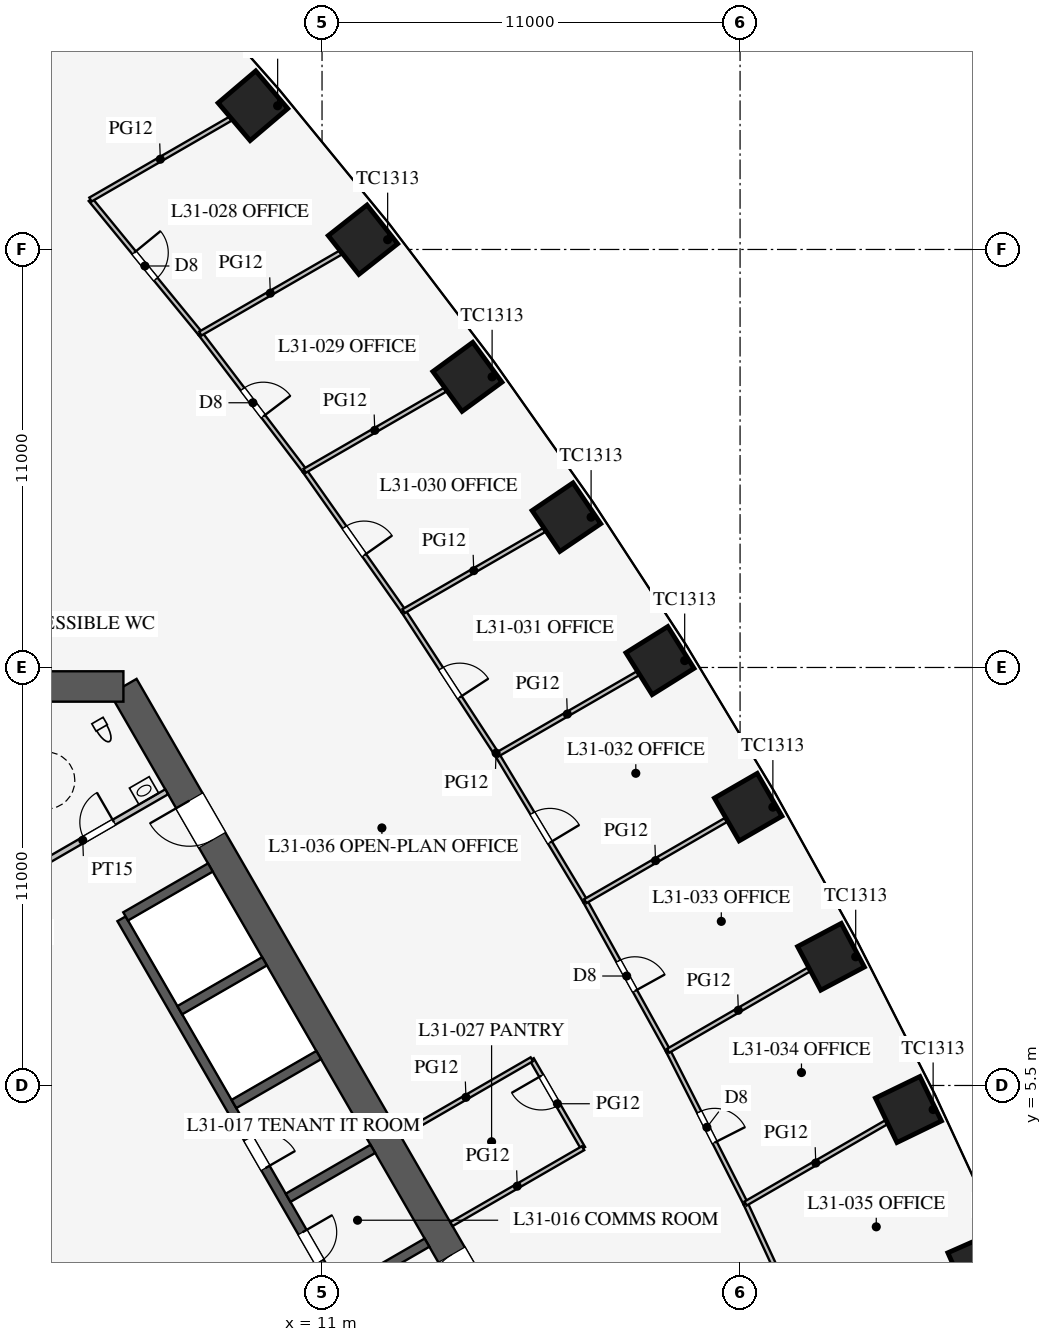
"""IFC4 building model, lengths in metres.
Left out: names, types, materials, properties, quantities, classifications, styles, units other than length and angle.
Written with IfcOpenShell. Run it as: python <this file> out.ifc"""

import sys

from ifc_helpers import new_model, si_unit, direction, frame, frame_2d, origin, origin_2d, place, context, subcontext, project, spatial, rectangle, extrude, element, fill, save


model = new_model("IFC4")
c1 = context("Model", 3, precision=1e-05, world=origin(), true_north=direction((0.0, 1.0)))
c2 = subcontext(c1, "Body", "Model", "MODEL_VIEW")
j1 = project(units=[si_unit("LENGTHUNIT", "METRE"), si_unit("PLANEANGLEUNIT", "RADIAN")], contexts=[c1])
p1 = place(None, origin())
s1 = spatial("IfcSite", under=j1, at=p1, CompositionType="ELEMENT")
p2 = place(p1, origin())
s2 = spatial("IfcBuilding", under=s1, at=p2, CompositionType="ELEMENT")
p3 = place(p2, frame((0.0, 0.0, 136.7)))
s3 = spatial("IfcBuildingStorey", under=s2, at=p3, CompositionType="ELEMENT", Elevation=136.7)
for number, where, z_axis, x_axis in (
    (1, (28.325, 0.765, 0.0), (0.0, 0.0, 1.0), (-0.403, 0.915, 0.0)),
    (2, (26.43, 4.867, 0.0), (0.0, 0.0, 1.0), (-0.436, 0.9, 0.0)),
    (3, (24.393, 8.887, 0.0), (0.0, 0.0, 1.0), (-0.468, 0.883, 0.0)),
    (4, (22.213, 12.825, 0.0), (0.0, 0.0, 1.0), (-0.5, 0.866, 0.0)),
    (5, (19.893, 16.681, 0.0), (0.0, 0.0, 1.0), (-0.531, 0.847, 0.0)),
    (6, (17.43, 20.456, 0.0), (0.0, 0.0, 1.0), (-0.561, 0.828, 0.0)),
    (7, (14.825, 24.148, 0.0), (0.0, 0.0, 1.0), (-0.591, 0.807, 0.0)),
    (8, (12.077, 27.757, 0.0), (0.0, 0.0, 1.0), (-0.62, 0.785, 0.0)),
    (9, (9.182, 31.282, 0.0), (0.0, 0.0, 1.0), (-0.648, 0.762, 0.0)),
):
    element("IfcColumn", number, at=place(p3, frame(where, z_axis=z_axis, x_axis=x_axis)), inside=s3, PredefinedType="COLUMN", context=c2, shape_type="SweptSolid", body=[
        extrude(rectangle(XDim=1.3, YDim=1.3, at=origin_2d()), origin(), (0.0, 0.0, 1.0), 4.2),
    ])
p4 = place(p3, frame((16.743, -3.0, 0.0), z_axis=(0.0, 0.0, 1.0), x_axis=(-0.500002442456, 0.866023993627, 0.0)))
e10 = element("IfcWall", 10, at=p4, inside=s3, PredefinedType="SHEAR", context=c2, shape_type="SweptSolid", body=[
    extrude(rectangle(XDim=21.939, YDim=0.8, at=frame_2d((10.97, 0.0))), origin(), (0.0, 0.0, 1.0), 4.2),
])
p5 = place(p4, frame((17.27, 0.0, 0.0)))
e11 = element("IfcOpeningElement", 11, at=p5, cuts=e10, PredefinedType="OPENING", context=c2, shape_type="SweptSolid", body=[
    extrude(rectangle(XDim=1.2, YDim=2.1, at=frame_2d((0.6, 1.05))), frame((0.0, 0.41, 0.0), z_axis=(0.0, -1.0, 0.0), x_axis=(1.0, 0.0, 0.0)), (0.0, 0.0, 1.0), 0.82),
])
p6 = place(p4, frame((3.47, 0.0, 0.0)))
e12 = element("IfcOpeningElement", 12, at=p6, cuts=e10, PredefinedType="OPENING", context=c2, shape_type="SweptSolid", body=[
    extrude(rectangle(XDim=1.2, YDim=2.1, at=frame_2d((0.6, 1.05))), frame((0.0, 0.41, 0.0), z_axis=(0.0, -1.0, 0.0), x_axis=(1.0, 0.0, 0.0)), (0.0, 0.0, 1.0), 0.82),
])
p7 = place(p3, frame((5.773, 16.0, 0.0), z_axis=(0.0, 0.0, 1.0), x_axis=(-1.0, 0.0, 0.0)))
e13 = element("IfcWall", 13, at=p7, inside=s3, PredefinedType="SHEAR", context=c2, shape_type="SweptSolid", body=[
    extrude(rectangle(XDim=11.547, YDim=0.8, at=frame_2d((5.773, 0.0))), origin(), (0.0, 0.0, 1.0), 4.2),
])
p8 = place(p3, frame((11.424, 0.014, 0.0), z_axis=(0.0, 0.0, 1.0), x_axis=(-0.500001763848, 0.866024385424, 0.0)))
e14 = element("IfcWall", 14, at=p8, inside=s3, PredefinedType="SHEAR", context=c2, shape_type="SweptSolid", body=[
    extrude(rectangle(XDim=11.4, YDim=0.25, at=frame_2d((5.7, 0.0))), origin(), (0.0, 0.0, 1.0), 4.2),
])
p9 = place(p8, frame((0.975, 0.0, 0.0)))
e15 = element("IfcOpeningElement", 15, at=p9, cuts=e14, PredefinedType="OPENING", context=c2, shape_type="SweptSolid", body=[
    extrude(rectangle(XDim=0.9, YDim=2.1, at=frame_2d((0.45, 1.05))), frame((0.0, 0.135, 0.0), z_axis=(0.0, -1.0, 0.0), x_axis=(1.0, 0.0, 0.0)), (0.0, 0.0, 1.0), 0.27),
])
p10 = place(p8, frame((3.825, 0.0, 0.0)))
e16 = element("IfcOpeningElement", 16, at=p10, cuts=e14, PredefinedType="OPENING", context=c2, shape_type="SweptSolid", body=[
    extrude(rectangle(XDim=0.9, YDim=2.1, at=frame_2d((0.45, 1.05))), frame((0.0, 0.135, 0.0), z_axis=(0.0, -1.0, 0.0), x_axis=(1.0, 0.0, 0.0)), (0.0, 0.0, 1.0), 0.27),
])
for number, where, z_axis, x_axis in (
    (17, (11.532, 0.076, 0.0), (0.0, 0.0, 1.0), (0.866, 0.5, 0.0)),
    (18, (10.107, 2.544, 0.0), (0.0, 0.0, 1.0), (0.866, 0.5, 0.0)),
    (19, (8.682, 5.012, 0.0), (0.0, 0.0, 1.0), (0.866, 0.5, 0.0)),
    (20, (7.257, 7.481, 0.0), (0.0, 0.0, 1.0), (0.866, 0.5, 0.0)),
):
    element("IfcWall", number, at=place(p3, frame(where, z_axis=z_axis, x_axis=x_axis)), inside=s3, PredefinedType="SHEAR", context=c2, shape_type="SweptSolid", body=[
        extrude(rectangle(XDim=2.575, YDim=0.25, at=frame_2d((1.288, 0.0))), origin(), (0.0, 0.0, 1.0), 4.2),
    ])
p11 = place(p3, frame((5.832, 9.949, 0.0), z_axis=(0.0, 0.0, 1.0), x_axis=(0.866029291668, 0.499993265928, 0.0)))
e21 = element("IfcWall", 21, at=p11, inside=s3, PredefinedType="SHEAR", context=c2, shape_type="SweptSolid", body=[
    extrude(rectangle(XDim=2.575, YDim=0.25, at=frame_2d((1.288, 0.0))), origin(), (0.0, 0.0, 1.0), 4.2),
])
p12 = place(p3, frame((2.495, 10.678, 0.0), z_axis=(0.0, 0.0, 1.0), x_axis=(0.86602216432, 0.500005610874, 0.0)))
e22 = element("IfcWall", 22, at=p12, inside=s3, PredefinedType="PARTITIONING", context=c2, shape_type="SweptSolid", body=[
    extrude(rectangle(XDim=5.1, YDim=0.15, at=frame_2d((2.55, 0.0))), origin(), (0.0, 0.0, 1.0), 4.0),
])
p13 = place(p12, frame((2.6, 0.0, 0.0)))
e23 = element("IfcOpeningElement", 23, at=p13, cuts=e22, PredefinedType="OPENING", context=c2, shape_type="SweptSolid", body=[
    extrude(rectangle(XDim=0.9, YDim=2.1, at=frame_2d((0.45, 1.05))), frame((0.0, 0.085, 0.0), z_axis=(0.0, -1.0, 0.0), x_axis=(1.0, 0.0, 0.0)), (0.0, 0.0, 1.0), 0.17),
])
p14 = place(p3, frame((17.869, 3.85, 0.0), z_axis=(0.0, 0.0, 1.0), x_axis=(-0.500048589285, 0.86599734893, 0.0)))
e24 = element("IfcWall", 24, at=p14, inside=s3, PredefinedType="PARTITIONING", context=c2, shape_type="SweptSolid", body=[
    extrude(rectangle(XDim=2.7, YDim=0.12, at=frame_2d((1.35, 0.0))), origin(), (0.0, 0.0, 1.0), 2.9),
])
p15 = place(p14, frame((1.3, 0.0, 0.15)))
e25 = element("IfcOpeningElement", 25, at=p15, cuts=e24, PredefinedType="OPENING", context=c2, shape_type="SweptSolid", body=[
    extrude(rectangle(XDim=0.9, YDim=2.1, at=frame_2d((0.45, 1.05))), frame((0.0, 0.07, 0.0), z_axis=(0.0, -1.0, 0.0), x_axis=(1.0, 0.0, 0.0)), (0.0, 0.0, 1.0), 0.14),
])
for number, where, z_axis, x_axis in (
    (26, (13.055, 4.188, 0.0), (0.0, 0.0, 1.0), (0.866, 0.5, 0.0)),
    (27, (14.405, 1.85, 0.0), (0.0, 0.0, 1.0), (0.866, 0.5, 0.0)),
):
    element("IfcWall", number, at=place(p3, frame(where, z_axis=z_axis, x_axis=x_axis)), inside=s3, PredefinedType="PARTITIONING", context=c2, shape_type="SweptSolid", body=[
        extrude(rectangle(XDim=4.0, YDim=0.12, at=frame_2d((2.0, 0.0))), origin(), (0.0, 0.0, 1.0), 2.9),
    ])
p16 = place(p3, frame((17.927, 10.35, 0.0), z_axis=(0.0, 0.0, 1.0), x_axis=(-0.515548366618, 0.856860479703, 0.0)))
e28 = element("IfcWall", 28, at=p16, inside=s3, PredefinedType="PARTITIONING", context=c2, shape_type="SweptSolid", body=[
    extrude(rectangle(XDim=4.501, YDim=0.12, at=frame_2d((2.25, 0.0))), origin(), (0.0, 0.0, 1.0), 2.9),
])
p17 = place(p16, frame((1.8, 0.0, 0.15)))
e29 = element("IfcOpeningElement", 29, at=p17, cuts=e28, PredefinedType="OPENING", context=c2, shape_type="SweptSolid", body=[
    extrude(rectangle(XDim=0.9, YDim=2.1, at=frame_2d((0.45, 1.05))), frame((0.0, 0.07, 0.0), z_axis=(0.0, -1.0, 0.0), x_axis=(1.0, 0.0, 0.0)), (0.0, 0.0, 1.0), 0.14),
])
p18 = place(p3, frame((10.543, 21.675, 0.0), z_axis=(0.0, 0.0, 1.0), x_axis=(-0.605274299339, 0.796016973789, 0.0)))
e30 = element("IfcWall", 30, at=p18, inside=s3, PredefinedType="PARTITIONING", context=c2, shape_type="SweptSolid", body=[
    extrude(rectangle(XDim=4.536, YDim=0.12, at=frame_2d((2.268, 0.0))), origin(), (0.0, 0.0, 1.0), 2.9),
])
p19 = place(p18, frame((1.8, 0.0, 0.15)))
e31 = element("IfcOpeningElement", 31, at=p19, cuts=e30, PredefinedType="OPENING", context=c2, shape_type="SweptSolid", body=[
    extrude(rectangle(XDim=0.9, YDim=2.1, at=frame_2d((0.45, 1.05))), frame((0.0, 0.07, 0.0), z_axis=(0.0, -1.0, 0.0), x_axis=(1.0, 0.0, 0.0)), (0.0, 0.0, 1.0), 0.14),
])
p20 = place(p3, frame((7.797, 25.286, 0.0), z_axis=(0.0, 0.0, 1.0), x_axis=(-0.633843962561, 0.773460943503, 0.0)))
e32 = element("IfcWall", 32, at=p20, inside=s3, PredefinedType="PARTITIONING", context=c2, shape_type="SweptSolid", body=[
    extrude(rectangle(XDim=4.561, YDim=0.12, at=frame_2d((2.28, 0.0))), origin(), (0.0, 0.0, 1.0), 2.9),
])
p21 = place(p20, frame((1.85, 0.0, 0.15)))
e33 = element("IfcOpeningElement", 33, at=p21, cuts=e32, PredefinedType="OPENING", context=c2, shape_type="SweptSolid", body=[
    extrude(rectangle(XDim=0.9, YDim=2.1, at=frame_2d((0.45, 1.05))), frame((0.0, 0.07, 0.0), z_axis=(0.0, -1.0, 0.0), x_axis=(1.0, 0.0, 0.0)), (0.0, 0.0, 1.0), 0.14),
])
p22 = place(p3, frame((15.606, 14.206, 0.0), z_axis=(0.0, 0.0, 1.0), x_axis=(-0.546069464151, 0.837739900161, 0.0)))
e34 = element("IfcWall", 34, at=p22, inside=s3, PredefinedType="PARTITIONING", context=c2, shape_type="SweptSolid", body=[
    extrude(rectangle(XDim=4.507, YDim=0.12, at=frame_2d((2.253, 0.0))), origin(), (0.0, 0.0, 1.0), 2.9),
])
p23 = place(p22, frame((1.8, 0.0, 0.15)))
e35 = element("IfcOpeningElement", 35, at=p23, cuts=e34, PredefinedType="OPENING", context=c2, shape_type="SweptSolid", body=[
    extrude(rectangle(XDim=0.9, YDim=2.1, at=frame_2d((0.45, 1.05))), frame((0.0, 0.07, 0.0), z_axis=(0.0, -1.0, 0.0), x_axis=(1.0, 0.0, 0.0)), (0.0, 0.0, 1.0), 0.14),
])
p24 = place(p3, frame((13.145, 17.982, 0.0), z_axis=(0.0, 0.0, 1.0), x_axis=(-0.575987178736, 0.817458726745, 0.0)))
e36 = element("IfcWall", 36, at=p24, inside=s3, PredefinedType="PARTITIONING", context=c2, shape_type="SweptSolid", body=[
    extrude(rectangle(XDim=4.518, YDim=0.12, at=frame_2d((2.259, 0.0))), origin(), (0.0, 0.0, 1.0), 2.9),
])
p25 = place(p24, frame((1.8, 0.0, 0.15)))
e37 = element("IfcOpeningElement", 37, at=p25, cuts=e36, PredefinedType="OPENING", context=c2, shape_type="SweptSolid", body=[
    extrude(rectangle(XDim=0.9, YDim=2.1, at=frame_2d((0.45, 1.05))), frame((0.0, 0.07, 0.0), z_axis=(0.0, -1.0, 0.0), x_axis=(1.0, 0.0, 0.0)), (0.0, 0.0, 1.0), 0.14),
])
p26 = place(p3, frame((24.043, -1.708, 0.0), z_axis=(0.0, 0.0, 1.0), x_axis=(-0.41992827805, 0.90755729367, 0.0)))
e38 = element("IfcWall", 38, at=p26, inside=s3, PredefinedType="PARTITIONING", context=c2, shape_type="SweptSolid", body=[
    extrude(rectangle(XDim=4.519, YDim=0.12, at=frame_2d((2.259, 0.0))), origin(), (0.0, 0.0, 1.0), 2.9),
])
p27 = place(p26, frame((1.8, 0.0, 0.15)))
e39 = element("IfcOpeningElement", 39, at=p27, cuts=e38, PredefinedType="OPENING", context=c2, shape_type="SweptSolid", body=[
    extrude(rectangle(XDim=0.9, YDim=2.1, at=frame_2d((0.45, 1.05))), frame((0.0, 0.07, 0.0), z_axis=(0.0, -1.0, 0.0), x_axis=(1.0, 0.0, 0.0)), (0.0, 0.0, 1.0), 0.14),
])
p28 = place(p3, frame((20.106, 6.412, 0.0), z_axis=(0.0, 0.0, 1.0), x_axis=(-0.484292898211, 0.874905931368, 0.0)))
e40 = element("IfcWall", 40, at=p28, inside=s3, PredefinedType="PARTITIONING", context=c2, shape_type="SweptSolid", body=[
    extrude(rectangle(XDim=4.501, YDim=0.12, at=frame_2d((2.25, 0.0))), origin(), (0.0, 0.0, 1.0), 2.9),
])
p29 = place(p28, frame((1.8, 0.0, 0.15)))
e41 = element("IfcOpeningElement", 41, at=p29, cuts=e40, PredefinedType="OPENING", context=c2, shape_type="SweptSolid", body=[
    extrude(rectangle(XDim=0.9, YDim=2.1, at=frame_2d((0.45, 1.05))), frame((0.0, 0.07, 0.0), z_axis=(0.0, -1.0, 0.0), x_axis=(1.0, 0.0, 0.0)), (0.0, 0.0, 1.0), 0.14),
])
p30 = place(p3, frame((22.145, 2.393, 0.0), z_axis=(0.0, 0.0, 1.0), x_axis=(-0.452471679136, 0.891778772779, 0.0)))
e42 = element("IfcWall", 42, at=p30, inside=s3, PredefinedType="PARTITIONING", context=c2, shape_type="SweptSolid", body=[
    extrude(rectangle(XDim=4.507, YDim=0.12, at=frame_2d((2.253, 0.0))), origin(), (0.0, 0.0, 1.0), 2.9),
])
p31 = place(p30, frame((1.8, 0.0, 0.15)))
e43 = element("IfcOpeningElement", 43, at=p31, cuts=e42, PredefinedType="OPENING", context=c2, shape_type="SweptSolid", body=[
    extrude(rectangle(XDim=0.9, YDim=2.1, at=frame_2d((0.45, 1.05))), frame((0.0, 0.07, 0.0), z_axis=(0.0, -1.0, 0.0), x_axis=(1.0, 0.0, 0.0)), (0.0, 0.0, 1.0), 0.14),
])
p32 = place(p3, frame((17.927, 10.35, 0.0), z_axis=(0.0, 0.0, 1.0), x_axis=(0.866014192265, 0.500019418418, 0.0)))
e44 = element("IfcWall", 44, at=p32, inside=s3, PredefinedType="PARTITIONING", context=c2, shape_type="SweptSolid", body=[
    extrude(rectangle(XDim=4.27, YDim=0.12, at=frame_2d((2.135, 0.0))), origin(), (0.0, 0.0, 1.0), 2.9),
])
p33 = place(p3, frame((10.543, 21.675, 0.0), z_axis=(0.0, 0.0, 1.0), x_axis=(0.866031027007, 0.499990260167, 0.0)))
e45 = element("IfcWall", 45, at=p33, inside=s3, PredefinedType="PARTITIONING", context=c2, shape_type="SweptSolid", body=[
    extrude(rectangle(XDim=4.261, YDim=0.12, at=frame_2d((2.131, 0.0))), origin(), (0.0, 0.0, 1.0), 2.9),
])
p34 = place(p3, frame((7.797, 25.286, 0.0), z_axis=(0.0, 0.0, 1.0), x_axis=(0.865995408045, 0.500051950547, 0.0)))
e46 = element("IfcWall", 46, at=p34, inside=s3, PredefinedType="PARTITIONING", context=c2, shape_type="SweptSolid", body=[
    extrude(rectangle(XDim=4.254, YDim=0.12, at=frame_2d((2.127, 0.0))), origin(), (0.0, 0.0, 1.0), 2.9),
])
p35 = place(p3, frame((4.906, 28.813, 0.0), z_axis=(0.0, 0.0, 1.0), x_axis=(0.866022790583, 0.50000452617, 0.0)))
e47 = element("IfcWall", 47, at=p35, inside=s3, PredefinedType="PARTITIONING", context=c2, shape_type="SweptSolid", body=[
    extrude(rectangle(XDim=4.246, YDim=0.12, at=frame_2d((2.123, 0.0))), origin(), (0.0, 0.0, 1.0), 2.9),
])
p36 = place(p3, frame((15.606, 14.206, 0.0), z_axis=(0.0, 0.0, 1.0), x_axis=(0.866020825576, 0.500007929605, 0.0)))
e48 = element("IfcWall", 48, at=p36, inside=s3, PredefinedType="PARTITIONING", context=c2, shape_type="SweptSolid", body=[
    extrude(rectangle(XDim=4.269, YDim=0.12, at=frame_2d((2.135, 0.0))), origin(), (0.0, 0.0, 1.0), 2.9),
])
p37 = place(p3, frame((13.145, 17.982, 0.0), z_axis=(0.0, 0.0, 1.0), x_axis=(0.86602643523, 0.49999821348, 0.0)))
e49 = element("IfcWall", 49, at=p37, inside=s3, PredefinedType="PARTITIONING", context=c2, shape_type="SweptSolid", body=[
    extrude(rectangle(XDim=4.266, YDim=0.12, at=frame_2d((2.133, 0.0))), origin(), (0.0, 0.0, 1.0), 2.9),
])
p38 = place(p3, frame((20.106, 6.412, 0.0), z_axis=(0.0, 0.0, 1.0), x_axis=(0.866020825576, 0.500007929605, 0.0)))
e50 = element("IfcWall", 50, at=p38, inside=s3, PredefinedType="PARTITIONING", context=c2, shape_type="SweptSolid", body=[
    extrude(rectangle(XDim=4.269, YDim=0.12, at=frame_2d((2.135, 0.0))), origin(), (0.0, 0.0, 1.0), 2.9),
])
p39 = place(p3, frame((22.145, 2.393, 0.0), z_axis=(0.0, 0.0, 1.0), x_axis=(0.86602643523, 0.49999821348, 0.0)))
e51 = element("IfcWall", 51, at=p39, inside=s3, PredefinedType="PARTITIONING", context=c2, shape_type="SweptSolid", body=[
    extrude(rectangle(XDim=4.266, YDim=0.12, at=frame_2d((2.133, 0.0))), origin(), (0.0, 0.0, 1.0), 2.9),
])
p40 = place(p13, origin())
e52 = element("IfcDoor", 52, at=p40, inside=s3, OperationType="SINGLE_SWING_RIGHT", PredefinedType="DOOR", context=c2, shape_type="SweptSolid", body=[
    extrude(rectangle(XDim=0.9, YDim=2.1, at=frame_2d((0.45, 1.05))), frame((0.0, 0.025, 0.0), z_axis=(0.0, -1.0, 0.0), x_axis=(1.0, 0.0, 0.0)), (0.0, 0.0, 1.0), 0.05),
])
fill(e23, e52)
p41 = place(p5, origin())
e53 = element("IfcDoor", 53, at=p41, inside=s3, OperationType="SINGLE_SWING_RIGHT", PredefinedType="DOOR", context=c2, shape_type="SweptSolid", body=[
    extrude(rectangle(XDim=1.2, YDim=2.1, at=frame_2d((0.6, 1.05))), frame((0.0, 0.025, 0.0), z_axis=(0.0, -1.0, 0.0), x_axis=(1.0, 0.0, 0.0)), (0.0, 0.0, 1.0), 0.05),
])
fill(e11, e53)
p42 = place(p6, origin())
e54 = element("IfcDoor", 54, at=p42, inside=s3, OperationType="SINGLE_SWING_LEFT", PredefinedType="DOOR", context=c2, shape_type="SweptSolid", body=[
    extrude(rectangle(XDim=1.2, YDim=2.1, at=frame_2d((0.6, 1.05))), frame((0.0, 0.025, 0.0), z_axis=(0.0, -1.0, 0.0), x_axis=(1.0, 0.0, 0.0)), (0.0, 0.0, 1.0), 0.05),
])
fill(e12, e54)
p43 = place(p9, frame((0.9, 0.0, 0.0), z_axis=(0.0, 0.0, 1.0), x_axis=(-1.0, 0.0, 0.0)))
e55 = element("IfcDoor", 55, at=p43, inside=s3, OperationType="SINGLE_SWING_LEFT", PredefinedType="DOOR", context=c2, shape_type="SweptSolid", body=[
    extrude(rectangle(XDim=0.9, YDim=2.1, at=frame_2d((0.45, 1.05))), frame((0.0, 0.025, 0.0), z_axis=(0.0, -1.0, 0.0), x_axis=(1.0, 0.0, 0.0)), (0.0, 0.0, 1.0), 0.05),
])
fill(e15, e55)
p44 = place(p10, frame((0.9, 0.0, 0.0), z_axis=(0.0, 0.0, 1.0), x_axis=(-1.0, 0.0, 0.0)))
e56 = element("IfcDoor", 56, at=p44, inside=s3, OperationType="SINGLE_SWING_RIGHT", PredefinedType="DOOR", context=c2, shape_type="SweptSolid", body=[
    extrude(rectangle(XDim=0.9, YDim=2.1, at=frame_2d((0.45, 1.05))), frame((0.0, 0.025, 0.0), z_axis=(0.0, -1.0, 0.0), x_axis=(1.0, 0.0, 0.0)), (0.0, 0.0, 1.0), 0.05),
])
fill(e16, e56)
p45 = place(p15, origin())
e57 = element("IfcDoor", 57, at=p45, inside=s3, OperationType="SINGLE_SWING_RIGHT", PredefinedType="DOOR", context=c2, shape_type="SweptSolid", body=[
    extrude(rectangle(XDim=0.9, YDim=2.1, at=frame_2d((0.45, 1.05))), frame((0.0, 0.025, 0.0), z_axis=(0.0, -1.0, 0.0), x_axis=(1.0, 0.0, 0.0)), (0.0, 0.0, 1.0), 0.05),
])
fill(e25, e57)
p46 = place(p21, frame((0.9, 0.0, 0.0), z_axis=(0.0, 0.0, 1.0), x_axis=(-1.0, 0.0, 0.0)))
e58 = element("IfcDoor", 58, at=p46, inside=s3, OperationType="SINGLE_SWING_LEFT", PredefinedType="DOOR", context=c2, shape_type="SweptSolid", body=[
    extrude(rectangle(XDim=0.9, YDim=2.1, at=frame_2d((0.45, 1.05))), frame((0.0, 0.025, 0.0), z_axis=(0.0, -1.0, 0.0), x_axis=(1.0, 0.0, 0.0)), (0.0, 0.0, 1.0), 0.05),
])
fill(e33, e58)
p47 = place(p19, frame((0.9, 0.0, 0.0), z_axis=(0.0, 0.0, 1.0), x_axis=(-1.0, 0.0, 0.0)))
e59 = element("IfcDoor", 59, at=p47, inside=s3, OperationType="SINGLE_SWING_RIGHT", PredefinedType="DOOR", context=c2, shape_type="SweptSolid", body=[
    extrude(rectangle(XDim=0.9, YDim=2.1, at=frame_2d((0.45, 1.05))), frame((0.0, 0.025, 0.0), z_axis=(0.0, -1.0, 0.0), x_axis=(1.0, 0.0, 0.0)), (0.0, 0.0, 1.0), 0.05),
])
fill(e31, e59)
p48 = place(p25, frame((0.9, 0.0, 0.0), z_axis=(0.0, 0.0, 1.0), x_axis=(-1.0, 0.0, 0.0)))
e60 = element("IfcDoor", 60, at=p48, inside=s3, OperationType="SINGLE_SWING_RIGHT", PredefinedType="DOOR", context=c2, shape_type="SweptSolid", body=[
    extrude(rectangle(XDim=0.9, YDim=2.1, at=frame_2d((0.45, 1.05))), frame((0.0, 0.025, 0.0), z_axis=(0.0, -1.0, 0.0), x_axis=(1.0, 0.0, 0.0)), (0.0, 0.0, 1.0), 0.05),
])
fill(e37, e60)
p49 = place(p23, frame((0.9, 0.0, 0.0), z_axis=(0.0, 0.0, 1.0), x_axis=(-1.0, 0.0, 0.0)))
e61 = element("IfcDoor", 61, at=p49, inside=s3, OperationType="SINGLE_SWING_RIGHT", PredefinedType="DOOR", context=c2, shape_type="SweptSolid", body=[
    extrude(rectangle(XDim=0.9, YDim=2.1, at=frame_2d((0.45, 1.05))), frame((0.0, 0.025, 0.0), z_axis=(0.0, -1.0, 0.0), x_axis=(1.0, 0.0, 0.0)), (0.0, 0.0, 1.0), 0.05),
])
fill(e35, e61)
p50 = place(p17, frame((0.9, 0.0, 0.0), z_axis=(0.0, 0.0, 1.0), x_axis=(-1.0, 0.0, 0.0)))
e62 = element("IfcDoor", 62, at=p50, inside=s3, OperationType="SINGLE_SWING_RIGHT", PredefinedType="DOOR", context=c2, shape_type="SweptSolid", body=[
    extrude(rectangle(XDim=0.9, YDim=2.1, at=frame_2d((0.45, 1.05))), frame((0.0, 0.025, 0.0), z_axis=(0.0, -1.0, 0.0), x_axis=(1.0, 0.0, 0.0)), (0.0, 0.0, 1.0), 0.05),
])
fill(e29, e62)
p51 = place(p29, frame((0.9, 0.0, 0.0), z_axis=(0.0, 0.0, 1.0), x_axis=(-1.0, 0.0, 0.0)))
e63 = element("IfcDoor", 63, at=p51, inside=s3, OperationType="SINGLE_SWING_RIGHT", PredefinedType="DOOR", context=c2, shape_type="SweptSolid", body=[
    extrude(rectangle(XDim=0.9, YDim=2.1, at=frame_2d((0.45, 1.05))), frame((0.0, 0.025, 0.0), z_axis=(0.0, -1.0, 0.0), x_axis=(1.0, 0.0, 0.0)), (0.0, 0.0, 1.0), 0.05),
])
fill(e41, e63)
p52 = place(p31, frame((0.9, 0.0, 0.0), z_axis=(0.0, 0.0, 1.0), x_axis=(-1.0, 0.0, 0.0)))
e64 = element("IfcDoor", 64, at=p52, inside=s3, OperationType="SINGLE_SWING_RIGHT", PredefinedType="DOOR", context=c2, shape_type="SweptSolid", body=[
    extrude(rectangle(XDim=0.9, YDim=2.1, at=frame_2d((0.45, 1.05))), frame((0.0, 0.025, 0.0), z_axis=(0.0, -1.0, 0.0), x_axis=(1.0, 0.0, 0.0)), (0.0, 0.0, 1.0), 0.05),
])
fill(e43, e64)
save(model, sys.argv[1])
